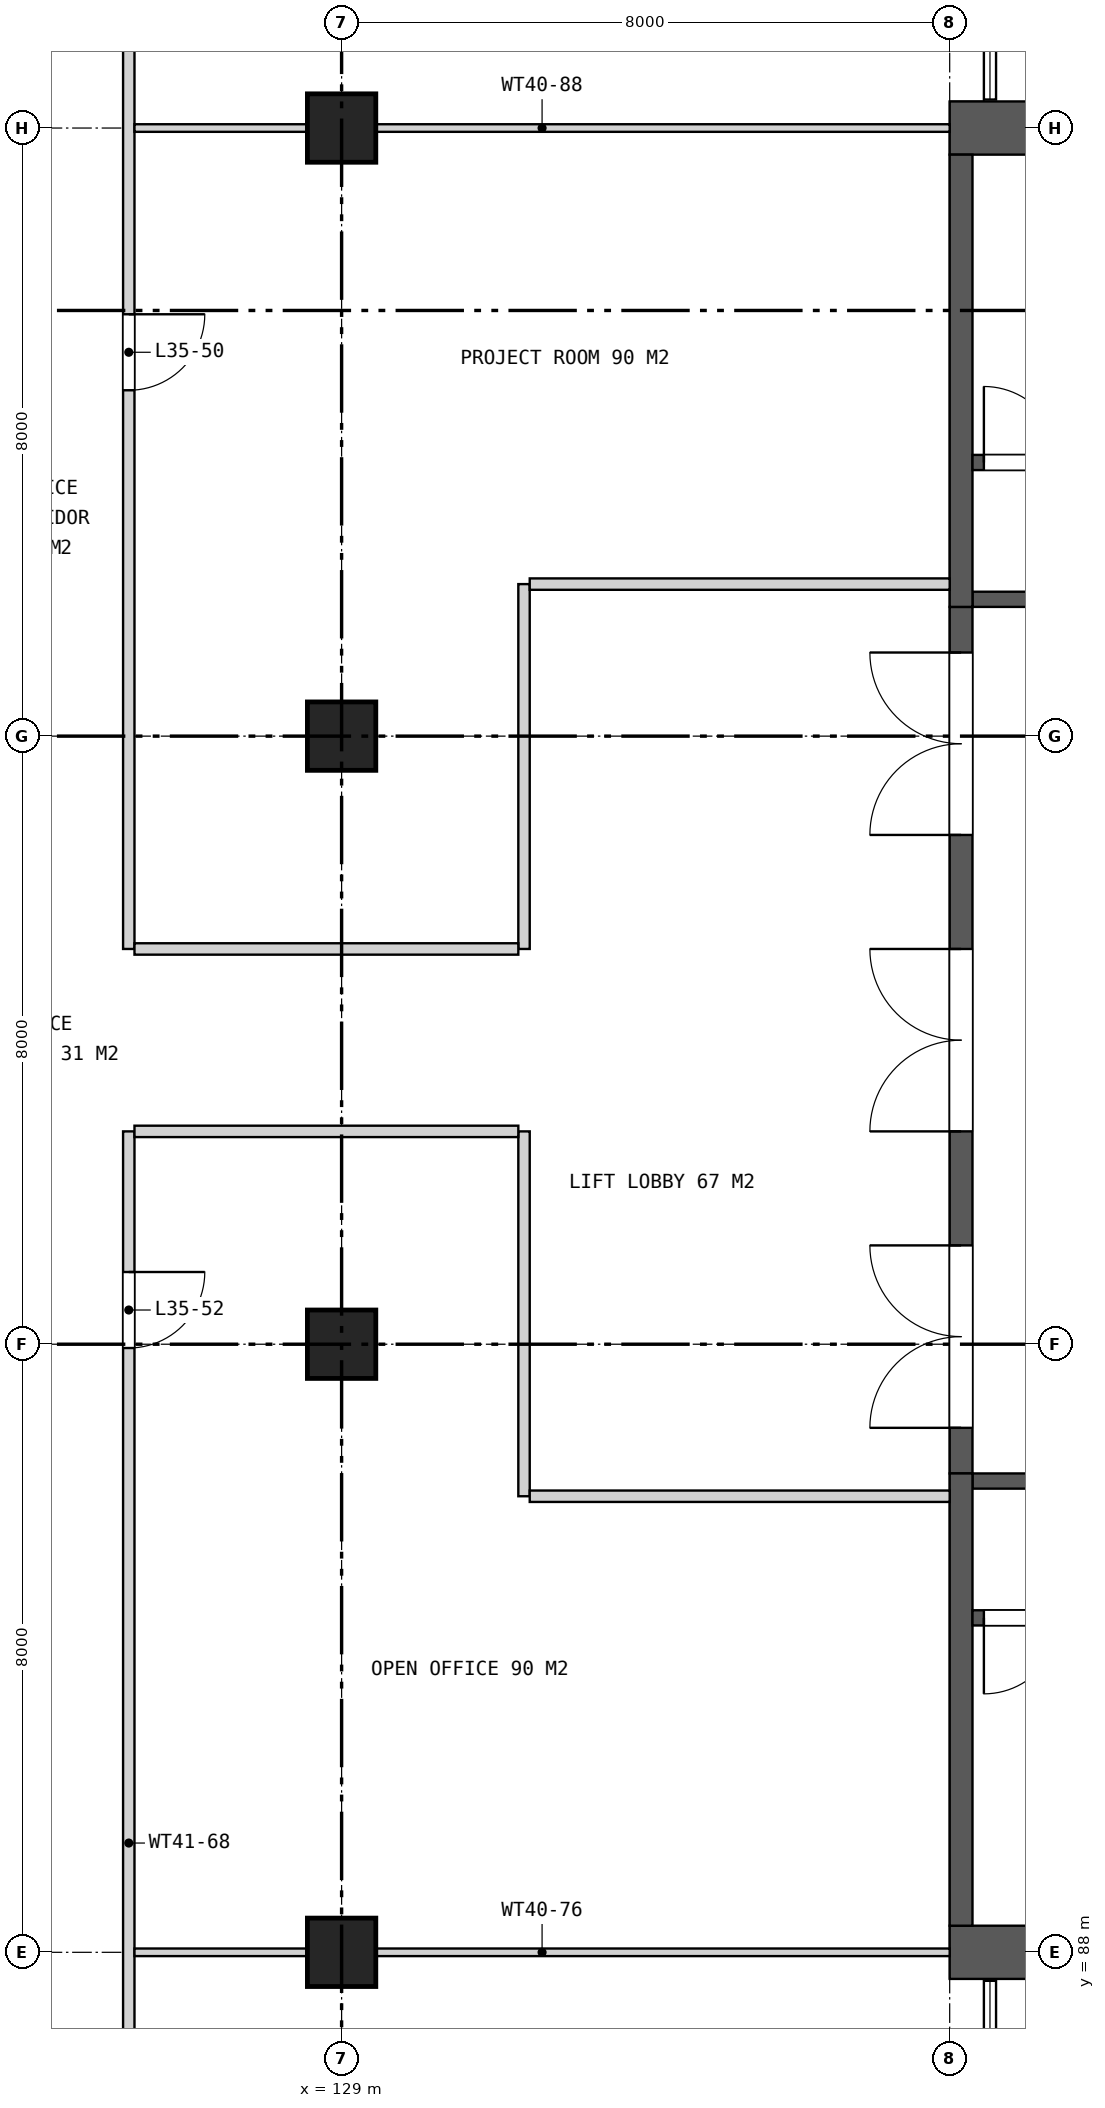
"""IFC4 building model, lengths in metres.
Left out: names, types, materials, properties, quantities, classifications, styles, units other than length and angle.
Written with IfcOpenShell. Run it as: python <this file> out.ifc"""

import sys

from ifc_helpers import new_model, si_unit, direction, frame, frame_2d, origin, origin_2d, place, context, subcontext, project, spatial, rectangle, extrude, element, fill, save


model = new_model("IFC4")
c1 = context("Model", 3, precision=1e-05, world=origin(), true_north=direction((0.0, 1.0)))
c2 = subcontext(c1, "Body", "Model", "MODEL_VIEW")
j1 = project(units=[si_unit("LENGTHUNIT", "METRE"), si_unit("PLANEANGLEUNIT", "RADIAN")], contexts=[c1])
p1 = place(None, origin())
s1 = spatial("IfcSite", under=j1, at=p1, CompositionType="ELEMENT")
p2 = place(p1, origin())
s2 = spatial("IfcBuilding", under=s1, at=p2, CompositionType="ELEMENT")
p3 = place(p2, frame((0.0, 0.0, 167.3)))
s3 = spatial("IfcBuildingStorey", under=s2, at=p3, CompositionType="ELEMENT", Elevation=167.3)
for number, where, z_axis, x_axis in (
    (1, (129.0, 88.0, 0.0), (0.0, 0.0, 1.0), (1.0, 0.0, 0.0)),
    (2, (129.0, 96.0, 0.0), (0.0, 0.0, 1.0), (1.0, 0.0, 0.0)),
    (3, (129.0, 104.0, 0.0), (0.0, 0.0, 1.0), (1.0, 0.0, 0.0)),
    (4, (129.0, 112.0, 0.0), (0.0, 0.0, 1.0), (1.0, 0.0, 0.0)),
):
    element("IfcColumn", number, at=place(p3, frame(where, z_axis=z_axis, x_axis=x_axis)), inside=s3, PredefinedType="COLUMN", context=c2, shape_type="SweptSolid", body=[
        extrude(rectangle(XDim=0.9, YDim=0.9, at=origin_2d()), origin(), (0.0, 0.0, 1.0), 4.2),
    ])
for number, where, z_axis, x_axis in (
    (5, (137.0, 112.0, 0.0), (0.0, 0.0, 1.0), (1.0, 0.0, 0.0)),
    (6, (137.0, 88.0, 0.0), (0.0, 0.0, 1.0), (1.0, 0.0, 0.0)),
):
    element("IfcWall", number, at=place(p3, frame(where, z_axis=z_axis, x_axis=x_axis)), inside=s3, PredefinedType="SHEAR", context=c2, shape_type="SweptSolid", body=[
        extrude(rectangle(XDim=7.1, YDim=0.7, at=frame_2d((3.55, 0.0))), origin(), (0.0, 0.0, 1.0), 4.2),
    ])
p4 = place(p3, frame((137.15, 94.3, 0.0), z_axis=(0.0, 0.0, 1.0), x_axis=(0.0, 1.0, 0.0)))
e7 = element("IfcWall", 7, at=p4, inside=s3, PredefinedType="SHEAR", context=c2, shape_type="SweptSolid", body=[
    extrude(rectangle(XDim=11.4, YDim=0.3, at=frame_2d((5.7, 0.0))), origin(), (0.0, 0.0, 1.0), 4.2),
])
p5 = place(p4, frame((0.6, 0.0, 0.0)))
e8 = element("IfcOpeningElement", 8, at=p5, cuts=e7, PredefinedType="OPENING", context=c2, shape_type="SweptSolid", body=[
    extrude(rectangle(XDim=2.4, YDim=2.4, at=frame_2d((1.2, 1.2))), frame((0.0, 0.16, 0.0), z_axis=(0.0, -1.0, 0.0), x_axis=(1.0, 0.0, 0.0)), (0.0, 0.0, 1.0), 0.32),
])
p6 = place(p4, frame((4.5, 0.0, 0.0)))
e9 = element("IfcOpeningElement", 9, at=p6, cuts=e7, PredefinedType="OPENING", context=c2, shape_type="SweptSolid", body=[
    extrude(rectangle(XDim=2.4, YDim=2.4, at=frame_2d((1.2, 1.2))), frame((0.0, 0.16, 0.0), z_axis=(0.0, -1.0, 0.0), x_axis=(1.0, 0.0, 0.0)), (0.0, 0.0, 1.0), 0.32),
])
p7 = place(p4, frame((8.4, 0.0, 0.0)))
e10 = element("IfcOpeningElement", 10, at=p7, cuts=e7, PredefinedType="OPENING", context=c2, shape_type="SweptSolid", body=[
    extrude(rectangle(XDim=2.4, YDim=2.4, at=frame_2d((1.2, 1.2))), frame((0.0, 0.16, 0.0), z_axis=(0.0, -1.0, 0.0), x_axis=(1.0, 0.0, 0.0)), (0.0, 0.0, 1.0), 0.32),
])
p8 = place(p3, frame((137.3, 105.8, 0.0), z_axis=(0.0, 0.0, 1.0), x_axis=(1.0, 0.0, 0.0)))
e11 = element("IfcWall", 11, at=p8, inside=s3, PredefinedType="SHEAR", context=c2, shape_type="SweptSolid", body=[
    extrude(rectangle(XDim=15.35, YDim=0.2, at=frame_2d((7.675, 0.0))), origin(), (0.0, 0.0, 1.0), 4.2),
])
p9 = place(p8, frame((0.95, 0.0, 0.0)))
e12 = element("IfcOpeningElement", 12, at=p9, cuts=e11, PredefinedType="OPENING", context=c2, shape_type="SweptSolid", body=[
    extrude(rectangle(XDim=1.1, YDim=2.1, at=frame_2d((0.55, 1.05))), frame((0.0, 0.11, 0.0), z_axis=(0.0, -1.0, 0.0), x_axis=(1.0, 0.0, 0.0)), (0.0, 0.0, 1.0), 0.22),
])
p10 = place(p3, frame((137.15, 105.7, 0.0), z_axis=(0.0, 0.0, 1.0), x_axis=(0.0, 1.0, 0.0)))
e13 = element("IfcWall", 13, at=p10, inside=s3, PredefinedType="SHEAR", context=c2, shape_type="SweptSolid", body=[
    extrude(rectangle(XDim=5.95, YDim=0.3, at=frame_2d((2.975, 0.0))), origin(), (0.0, 0.0, 1.0), 4.2),
])
p11 = place(p3, frame((137.3, 107.6, 0.0), z_axis=(0.0, 0.0, 1.0), x_axis=(1.0, 0.0, 0.0)))
e14 = element("IfcWall", 14, at=p11, inside=s3, PredefinedType="SHEAR", context=c2, shape_type="SweptSolid", body=[
    extrude(rectangle(XDim=6.8, YDim=0.2, at=frame_2d((3.4, 0.0))), origin(), (0.0, 0.0, 1.0), 4.2),
])
p12 = place(p11, frame((0.15, 0.0, 0.0)))
e15 = element("IfcOpeningElement", 15, at=p12, cuts=e14, PredefinedType="OPENING", context=c2, shape_type="SweptSolid", body=[
    extrude(rectangle(XDim=1.0, YDim=2.1, at=frame_2d((0.5, 1.05))), frame((0.0, 0.11, 0.0), z_axis=(0.0, -1.0, 0.0), x_axis=(1.0, 0.0, 0.0)), (0.0, 0.0, 1.0), 0.22),
])
p13 = place(p3, frame((137.3, 94.2, 0.0), z_axis=(0.0, 0.0, 1.0), x_axis=(1.0, 0.0, 0.0)))
e16 = element("IfcWall", 16, at=p13, inside=s3, PredefinedType="SHEAR", context=c2, shape_type="SweptSolid", body=[
    extrude(rectangle(XDim=15.35, YDim=0.2, at=frame_2d((7.675, 0.0))), origin(), (0.0, 0.0, 1.0), 4.2),
])
p14 = place(p13, frame((0.95, 0.0, 0.0)))
e17 = element("IfcOpeningElement", 17, at=p14, cuts=e16, PredefinedType="OPENING", context=c2, shape_type="SweptSolid", body=[
    extrude(rectangle(XDim=1.1, YDim=2.1, at=frame_2d((0.55, 1.05))), frame((0.0, 0.11, 0.0), z_axis=(0.0, -1.0, 0.0), x_axis=(1.0, 0.0, 0.0)), (0.0, 0.0, 1.0), 0.22),
])
p15 = place(p3, frame((137.15, 88.35, 0.0), z_axis=(0.0, 0.0, 1.0), x_axis=(0.0, 1.0, 0.0)))
e18 = element("IfcWall", 18, at=p15, inside=s3, PredefinedType="SHEAR", context=c2, shape_type="SweptSolid", body=[
    extrude(rectangle(XDim=5.95, YDim=0.3, at=frame_2d((2.975, 0.0))), origin(), (0.0, 0.0, 1.0), 4.2),
])
p16 = place(p3, frame((137.3, 92.4, 0.0), z_axis=(0.0, 0.0, 1.0), x_axis=(1.0, 0.0, 0.0)))
e19 = element("IfcWall", 19, at=p16, inside=s3, PredefinedType="SHEAR", context=c2, shape_type="SweptSolid", body=[
    extrude(rectangle(XDim=6.8, YDim=0.2, at=frame_2d((3.4, 0.0))), origin(), (0.0, 0.0, 1.0), 4.2),
])
p17 = place(p16, frame((0.15, 0.0, 0.0)))
e20 = element("IfcOpeningElement", 20, at=p17, cuts=e19, PredefinedType="OPENING", context=c2, shape_type="SweptSolid", body=[
    extrude(rectangle(XDim=1.0, YDim=2.1, at=frame_2d((0.5, 1.05))), frame((0.0, 0.11, 0.0), z_axis=(0.0, -1.0, 0.0), x_axis=(1.0, 0.0, 0.0)), (0.0, 0.0, 1.0), 0.22),
])
p18 = place(p3, frame((126.2, 80.075, 0.0), z_axis=(0.0, 0.0, 1.0), x_axis=(0.0, 1.0, 0.0)))
e21 = element("IfcWall", 21, at=p18, inside=s3, PredefinedType="PARTITIONING", context=c2, shape_type="SweptSolid", body=[
    extrude(rectangle(XDim=18.725, YDim=0.15, at=frame_2d((9.363, 0.0))), origin(), (0.0, 0.0, 1.0), 3.26),
])
p19 = place(p18, frame((15.875, 0.0, 0.0)))
e22 = element("IfcOpeningElement", 22, at=p19, cuts=e21, PredefinedType="OPENING", context=c2, shape_type="SweptSolid", body=[
    extrude(rectangle(XDim=1.0, YDim=2.1, at=frame_2d((0.5, 1.05))), frame((0.0, 0.085, 0.0), z_axis=(0.0, -1.0, 0.0), x_axis=(1.0, 0.0, 0.0)), (0.0, 0.0, 1.0), 0.17),
])
p20 = place(p18, frame((3.45, 0.0, 0.0)))
e23 = element("IfcOpeningElement", 23, at=p20, cuts=e21, PredefinedType="OPENING", context=c2, shape_type="SweptSolid", body=[
    extrude(rectangle(XDim=1.0, YDim=2.1, at=frame_2d((0.5, 1.05))), frame((0.0, 0.085, 0.0), z_axis=(0.0, -1.0, 0.0), x_axis=(1.0, 0.0, 0.0)), (0.0, 0.0, 1.0), 0.17),
])
p21 = place(p3, frame((126.2, 101.2, 0.0), z_axis=(0.0, 0.0, 1.0), x_axis=(0.0, 1.0, 0.0)))
e24 = element("IfcWall", 24, at=p21, inside=s3, PredefinedType="PARTITIONING", context=c2, shape_type="SweptSolid", body=[
    extrude(rectangle(XDim=18.725, YDim=0.15, at=frame_2d((9.363, 0.0))), origin(), (0.0, 0.0, 1.0), 3.26),
])
p22 = place(p21, frame((7.35, 0.0, 0.0)))
e25 = element("IfcOpeningElement", 25, at=p22, cuts=e24, PredefinedType="OPENING", context=c2, shape_type="SweptSolid", body=[
    extrude(rectangle(XDim=1.0, YDim=2.1, at=frame_2d((0.5, 1.05))), frame((0.0, 0.085, 0.0), z_axis=(0.0, -1.0, 0.0), x_axis=(1.0, 0.0, 0.0)), (0.0, 0.0, 1.0), 0.17),
])
p23 = place(p21, frame((14.25, 0.0, 0.0)))
e26 = element("IfcOpeningElement", 26, at=p23, cuts=e24, PredefinedType="OPENING", context=c2, shape_type="SweptSolid", body=[
    extrude(rectangle(XDim=1.0, YDim=2.1, at=frame_2d((0.5, 1.05))), frame((0.0, 0.085, 0.0), z_axis=(0.0, -1.0, 0.0), x_axis=(1.0, 0.0, 0.0)), (0.0, 0.0, 1.0), 0.17),
])
for number, where, z_axis, x_axis in (
    (27, (131.4, 94.0, 0.0), (0.0, 0.0, 1.0), (0.0, 1.0, 0.0)),
    (28, (131.4, 101.2, 0.0), (0.0, 0.0, 1.0), (0.0, 1.0, 0.0)),
):
    element("IfcWall", number, at=place(p3, frame(where, z_axis=z_axis, x_axis=x_axis)), inside=s3, PredefinedType="PARTITIONING", context=c2, shape_type="SweptSolid", body=[
        extrude(rectangle(XDim=4.8, YDim=0.15, at=frame_2d((2.4, 0.0))), origin(), (0.0, 0.0, 1.0), 3.26),
    ])
p24 = place(p3, frame((126.275, 88.0, 0.0), z_axis=(0.0, 0.0, 1.0), x_axis=(1.0, 0.0, 0.0)))
e29 = element("IfcWall", 29, at=p24, inside=s3, PredefinedType="PARTITIONING", context=c2, shape_type="SweptSolid", body=[
    extrude(rectangle(XDim=10.725, YDim=0.1, at=frame_2d((5.363, 0.0))), origin(), (0.0, 0.0, 1.0), 3.26),
])
p25 = place(p3, frame((131.475, 94.0, 0.0), z_axis=(0.0, 0.0, 1.0), x_axis=(1.0, 0.0, 0.0)))
e30 = element("IfcWall", 30, at=p25, inside=s3, PredefinedType="PARTITIONING", context=c2, shape_type="SweptSolid", body=[
    extrude(rectangle(XDim=5.525, YDim=0.15, at=frame_2d((2.762, 0.0))), origin(), (0.0, 0.0, 1.0), 3.26),
])
for number, where, z_axis, x_axis in (
    (31, (126.275, 98.8, 0.0), (0.0, 0.0, 1.0), (1.0, 0.0, 0.0)),
    (32, (126.275, 101.2, 0.0), (0.0, 0.0, 1.0), (1.0, 0.0, 0.0)),
):
    element("IfcWall", number, at=place(p3, frame(where, z_axis=z_axis, x_axis=x_axis)), inside=s3, PredefinedType="PARTITIONING", context=c2, shape_type="SweptSolid", body=[
        extrude(rectangle(XDim=5.05, YDim=0.15, at=frame_2d((2.525, 0.0))), origin(), (0.0, 0.0, 1.0), 3.26),
    ])
p26 = place(p3, frame((131.475, 106.0, 0.0), z_axis=(0.0, 0.0, 1.0), x_axis=(1.0, 0.0, 0.0)))
e33 = element("IfcWall", 33, at=p26, inside=s3, PredefinedType="PARTITIONING", context=c2, shape_type="SweptSolid", body=[
    extrude(rectangle(XDim=5.525, YDim=0.15, at=frame_2d((2.762, 0.0))), origin(), (0.0, 0.0, 1.0), 3.26),
])
p27 = place(p3, frame((126.275, 112.0, 0.0), z_axis=(0.0, 0.0, 1.0), x_axis=(1.0, 0.0, 0.0)))
e34 = element("IfcWall", 34, at=p27, inside=s3, PredefinedType="PARTITIONING", context=c2, shape_type="SweptSolid", body=[
    extrude(rectangle(XDim=10.725, YDim=0.1, at=frame_2d((5.363, 0.0))), origin(), (0.0, 0.0, 1.0), 3.26),
])
p28 = place(p5, origin())
e35 = element("IfcDoor", 35, at=p28, inside=s3, OperationType="DOUBLE_DOOR_SINGLE_SWING", PredefinedType="DOOR", context=c2, shape_type="SweptSolid", body=[
    extrude(rectangle(XDim=2.4, YDim=2.4, at=frame_2d((1.2, 1.2))), frame((0.0, 0.025, 0.0), z_axis=(0.0, -1.0, 0.0), x_axis=(1.0, 0.0, 0.0)), (0.0, 0.0, 1.0), 0.05),
])
fill(e8, e35)
p29 = place(p6, origin())
e36 = element("IfcDoor", 36, at=p29, inside=s3, OperationType="DOUBLE_DOOR_SINGLE_SWING", PredefinedType="DOOR", context=c2, shape_type="SweptSolid", body=[
    extrude(rectangle(XDim=2.4, YDim=2.4, at=frame_2d((1.2, 1.2))), frame((0.0, 0.025, 0.0), z_axis=(0.0, -1.0, 0.0), x_axis=(1.0, 0.0, 0.0)), (0.0, 0.0, 1.0), 0.05),
])
fill(e9, e36)
p30 = place(p7, origin())
e37 = element("IfcDoor", 37, at=p30, inside=s3, OperationType="DOUBLE_DOOR_SINGLE_SWING", PredefinedType="DOOR", context=c2, shape_type="SweptSolid", body=[
    extrude(rectangle(XDim=2.4, YDim=2.4, at=frame_2d((1.2, 1.2))), frame((0.0, 0.025, 0.0), z_axis=(0.0, -1.0, 0.0), x_axis=(1.0, 0.0, 0.0)), (0.0, 0.0, 1.0), 0.05),
])
fill(e10, e37)
p31 = place(p12, origin())
e38 = element("IfcDoor", 38, at=p31, inside=s3, OperationType="SINGLE_SWING_LEFT", PredefinedType="DOOR", context=c2, shape_type="SweptSolid", body=[
    extrude(rectangle(XDim=1.0, YDim=2.1, at=frame_2d((0.5, 1.05))), frame((0.0, 0.025, 0.0), z_axis=(0.0, -1.0, 0.0), x_axis=(1.0, 0.0, 0.0)), (0.0, 0.0, 1.0), 0.05),
])
fill(e15, e38)
p32 = place(p17, frame((1.0, 0.0, 0.0), z_axis=(0.0, 0.0, 1.0), x_axis=(-1.0, 0.0, 0.0)))
e39 = element("IfcDoor", 39, at=p32, inside=s3, OperationType="SINGLE_SWING_RIGHT", PredefinedType="DOOR", context=c2, shape_type="SweptSolid", body=[
    extrude(rectangle(XDim=1.0, YDim=2.1, at=frame_2d((0.5, 1.05))), frame((0.0, 0.025, 0.0), z_axis=(0.0, -1.0, 0.0), x_axis=(1.0, 0.0, 0.0)), (0.0, 0.0, 1.0), 0.05),
])
fill(e20, e39)
p33 = place(p22, frame((1.0, 0.0, 0.0), z_axis=(0.0, 0.0, 1.0), x_axis=(-1.0, 0.0, 0.0)))
e40 = element("IfcDoor", 40, at=p33, inside=s3, OperationType="SINGLE_SWING_LEFT", PredefinedType="DOOR", context=c2, shape_type="SweptSolid", body=[
    extrude(rectangle(XDim=1.0, YDim=2.1, at=frame_2d((0.5, 1.05))), frame((0.0, 0.025, 0.0), z_axis=(0.0, -1.0, 0.0), x_axis=(1.0, 0.0, 0.0)), (0.0, 0.0, 1.0), 0.05),
])
fill(e25, e40)
p34 = place(p19, frame((1.0, 0.0, 0.0), z_axis=(0.0, 0.0, 1.0), x_axis=(-1.0, 0.0, 0.0)))
e41 = element("IfcDoor", 41, at=p34, inside=s3, OperationType="SINGLE_SWING_LEFT", PredefinedType="DOOR", context=c2, shape_type="SweptSolid", body=[
    extrude(rectangle(XDim=1.0, YDim=2.1, at=frame_2d((0.5, 1.05))), frame((0.0, 0.025, 0.0), z_axis=(0.0, -1.0, 0.0), x_axis=(1.0, 0.0, 0.0)), (0.0, 0.0, 1.0), 0.05),
])
fill(e22, e41)
save(model, sys.argv[1])
